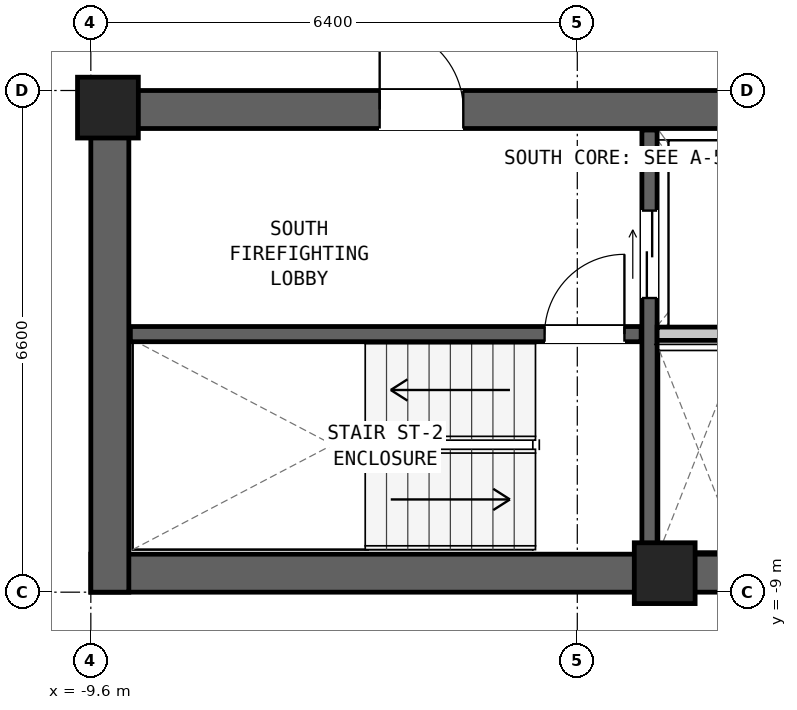
"""IFC4 building model, lengths in metres.
Left out: names, types, materials, properties, quantities, classifications, styles, units other than length and angle.
Written with IfcOpenShell. Run it as: python <this file> out.ifc"""

import sys

from ifc_helpers import new_model, si_unit, direction, frame, frame_2d, origin, origin_2d, place, context, subcontext, project, spatial, rectangle, extrude, element, fill, save


model = new_model("IFC4")
c1 = context("Model", 3, precision=1e-05, world=origin(), true_north=direction((0.0, 1.0)))
c2 = subcontext(c1, "Body", "Model", "MODEL_VIEW")
j1 = project(units=[si_unit("LENGTHUNIT", "METRE"), si_unit("PLANEANGLEUNIT", "RADIAN")], contexts=[c1])
p1 = place(None, origin())
s1 = spatial("IfcSite", under=j1, at=p1, CompositionType="ELEMENT")
p2 = place(p1, origin())
s2 = spatial("IfcBuilding", under=s1, at=p2, CompositionType="ELEMENT")
p3 = place(p2, frame((0.0, 0.0, 177.5)))
s3 = spatial("IfcBuildingStorey", under=s2, at=p3, CompositionType="ELEMENT", Elevation=177.5)
p4 = place(p3, frame((-9.6, -8.75, 0.0), z_axis=(0.0, 0.0, 1.0), x_axis=(1.0, 0.0, 0.0)))
e1 = element("IfcWall", 1, at=p4, inside=s3, PredefinedType="SHEAR", context=c2, shape_type="SweptSolid", body=[
    extrude(rectangle(XDim=19.2, YDim=0.5, at=frame_2d((9.6, 0.0))), origin(), (0.0, 0.0, 1.0), 3.05),
])
p5 = place(p3, frame((-9.6, -2.65, 0.0), z_axis=(0.0, 0.0, 1.0), x_axis=(1.0, 0.0, 0.0)))
e2 = element("IfcWall", 2, at=p5, inside=s3, PredefinedType="SHEAR", context=c2, shape_type="SweptSolid", body=[
    extrude(rectangle(XDim=19.2, YDim=0.5, at=frame_2d((9.6, 0.0))), origin(), (0.0, 0.0, 1.0), 3.05),
])
p6 = place(p5, frame((3.8, 0.0, 0.0)))
e3 = element("IfcOpeningElement", 3, at=p6, cuts=e2, PredefinedType="OPENING", context=c2, shape_type="SweptSolid", body=[
    extrude(rectangle(XDim=1.1, YDim=2.08, at=frame_2d((0.55, 1.04))), frame((0.0, 0.262, 0.0), z_axis=(0.0, -1.0, 0.0), x_axis=(1.0, 0.0, 0.0)), (0.0, 0.0, 1.0), 0.524),
])
p7 = place(p5, frame((12.2, 0.0, 0.0)))
e4 = element("IfcOpeningElement", 4, at=p7, cuts=e2, PredefinedType="OPENING", context=c2, shape_type="SweptSolid", body=[
    extrude(rectangle(XDim=1.6, YDim=2.12, at=frame_2d((0.8, 1.06))), frame((0.0, 0.262, 0.0), z_axis=(0.0, -1.0, 0.0), x_axis=(1.0, 0.0, 0.0)), (0.0, 0.0, 1.0), 0.524),
])
p8 = place(p5, frame((16.5, 0.0, 0.0)))
e5 = element("IfcOpeningElement", 5, at=p8, cuts=e2, PredefinedType="OPENING", context=c2, shape_type="SweptSolid", body=[
    extrude(rectangle(XDim=0.9, YDim=2.05, at=frame_2d((0.45, 1.025))), frame((0.0, 0.262, 0.0), z_axis=(0.0, -1.0, 0.0), x_axis=(1.0, 0.0, 0.0)), (0.0, 0.0, 1.0), 0.524),
])
p9 = place(p3, frame((-9.35, -9.0, 0.0), z_axis=(0.0, 0.0, 1.0), x_axis=(0.0, 1.0, 0.0)))
e6 = element("IfcWall", 6, at=p9, inside=s3, PredefinedType="SHEAR", context=c2, shape_type="SweptSolid", body=[
    extrude(rectangle(XDim=6.6, YDim=0.5, at=frame_2d((3.3, 0.0))), origin(), (0.0, 0.0, 1.0), 3.05),
])
for number, where, z_axis, x_axis in (
    (7, (-9.375, -2.625, 0.0), (0.0, 0.0, 1.0), (1.0, 0.0, 0.0)),
    (8, (-2.05, -8.75, 0.0), (0.0, 0.0, 1.0), (1.0, 0.0, 0.0)),
):
    element("IfcColumn", number, at=place(p3, frame(where, z_axis=z_axis, x_axis=x_axis)), inside=s3, PredefinedType="COLUMN", context=c2, shape_type="SweptSolid", body=[
        extrude(rectangle(XDim=0.8, YDim=0.8, at=origin_2d()), origin(), (0.0, 0.0, 1.0), 3.05),
    ])
p10 = place(p3, frame((-9.08, -5.605, 0.0), z_axis=(0.0, 0.0, 1.0), x_axis=(1.0, 0.0, 0.0)))
e9 = element("IfcWall", 9, at=p10, inside=s3, PredefinedType="SHEAR", context=c2, shape_type="SweptSolid", body=[
    extrude(rectangle(XDim=6.72, YDim=0.2, at=frame_2d((3.36, 0.0))), origin(), (0.0, 0.0, 1.0), 2.83),
])
p11 = place(p10, frame((5.45, 0.0, 0.0)))
e10 = element("IfcOpeningElement", 10, at=p11, cuts=e9, PredefinedType="OPENING", context=c2, shape_type="SweptSolid", body=[
    extrude(rectangle(XDim=1.05, YDim=2.08, at=frame_2d((0.525, 1.04))), frame((0.0, 0.112, 0.0), z_axis=(0.0, -1.0, 0.0), x_axis=(1.0, 0.0, 0.0)), (0.0, 0.0, 1.0), 0.224),
])
p12 = place(p3, frame((-2.25, -8.48, 0.0), z_axis=(0.0, 0.0, 1.0), x_axis=(0.0, 1.0, 0.0)))
e11 = element("IfcWall", 11, at=p12, inside=s3, PredefinedType="SHEAR", context=c2, shape_type="SweptSolid", body=[
    extrude(rectangle(XDim=5.56, YDim=0.2, at=frame_2d((2.78, 0.0))), origin(), (0.0, 0.0, 1.0), 2.83),
])
p13 = place(p12, frame((3.35, 0.0, 0.0)))
e12 = element("IfcOpeningElement", 12, at=p13, cuts=e11, PredefinedType="OPENING", context=c2, shape_type="SweptSolid", body=[
    extrude(rectangle(XDim=1.15, YDim=2.08, at=frame_2d((0.575, 1.04))), frame((0.0, 0.112, 0.0), z_axis=(0.0, -1.0, 0.0), x_axis=(1.0, 0.0, 0.0)), (0.0, 0.0, 1.0), 0.224),
])
p14 = place(p3, frame((-2.15, -5.6, 0.0), z_axis=(0.0, 0.0, 1.0), x_axis=(1.0, 0.0, 0.0)))
e13 = element("IfcWall", 13, at=p14, inside=s3, PredefinedType="PARTITIONING", context=c2, shape_type="SweptSolid", body=[
    extrude(rectangle(XDim=1.97, YDim=0.175, at=frame_2d((0.985, 0.0))), origin(), (0.0, 0.0, 1.0), 2.83),
])
p15 = place(p11, origin())
e14 = element("IfcDoor", 14, at=p15, inside=s3, OperationType="SINGLE_SWING_RIGHT", PredefinedType="DOOR", context=c2, shape_type="SweptSolid", body=[
    extrude(rectangle(XDim=1.05, YDim=2.08, at=frame_2d((0.525, 1.04))), frame((0.0, 0.025, 0.0), z_axis=(0.0, -1.0, 0.0), x_axis=(1.0, 0.0, 0.0)), (0.0, 0.0, 1.0), 0.05),
])
fill(e10, e14)
p16 = place(p6, origin())
e15 = element("IfcDoor", 15, at=p16, inside=s3, OperationType="SINGLE_SWING_LEFT", PredefinedType="DOOR", context=c2, shape_type="SweptSolid", body=[
    extrude(rectangle(XDim=1.1, YDim=2.08, at=frame_2d((0.55, 1.04))), frame((0.0, 0.025, 0.0), z_axis=(0.0, -1.0, 0.0), x_axis=(1.0, 0.0, 0.0)), (0.0, 0.0, 1.0), 0.05),
])
fill(e3, e15)
p17 = place(p13, origin())
e16 = element("IfcDoor", 16, at=p17, inside=s3, OperationType="DOUBLE_DOOR_SLIDING", PredefinedType="DOOR", context=c2, shape_type="SweptSolid", body=[
    extrude(rectangle(XDim=1.15, YDim=2.08, at=frame_2d((0.575, 1.04))), frame((0.0, 0.025, 0.0), z_axis=(0.0, -1.0, 0.0), x_axis=(1.0, 0.0, 0.0)), (0.0, 0.0, 1.0), 0.05),
])
fill(e12, e16)
save(model, sys.argv[1])
